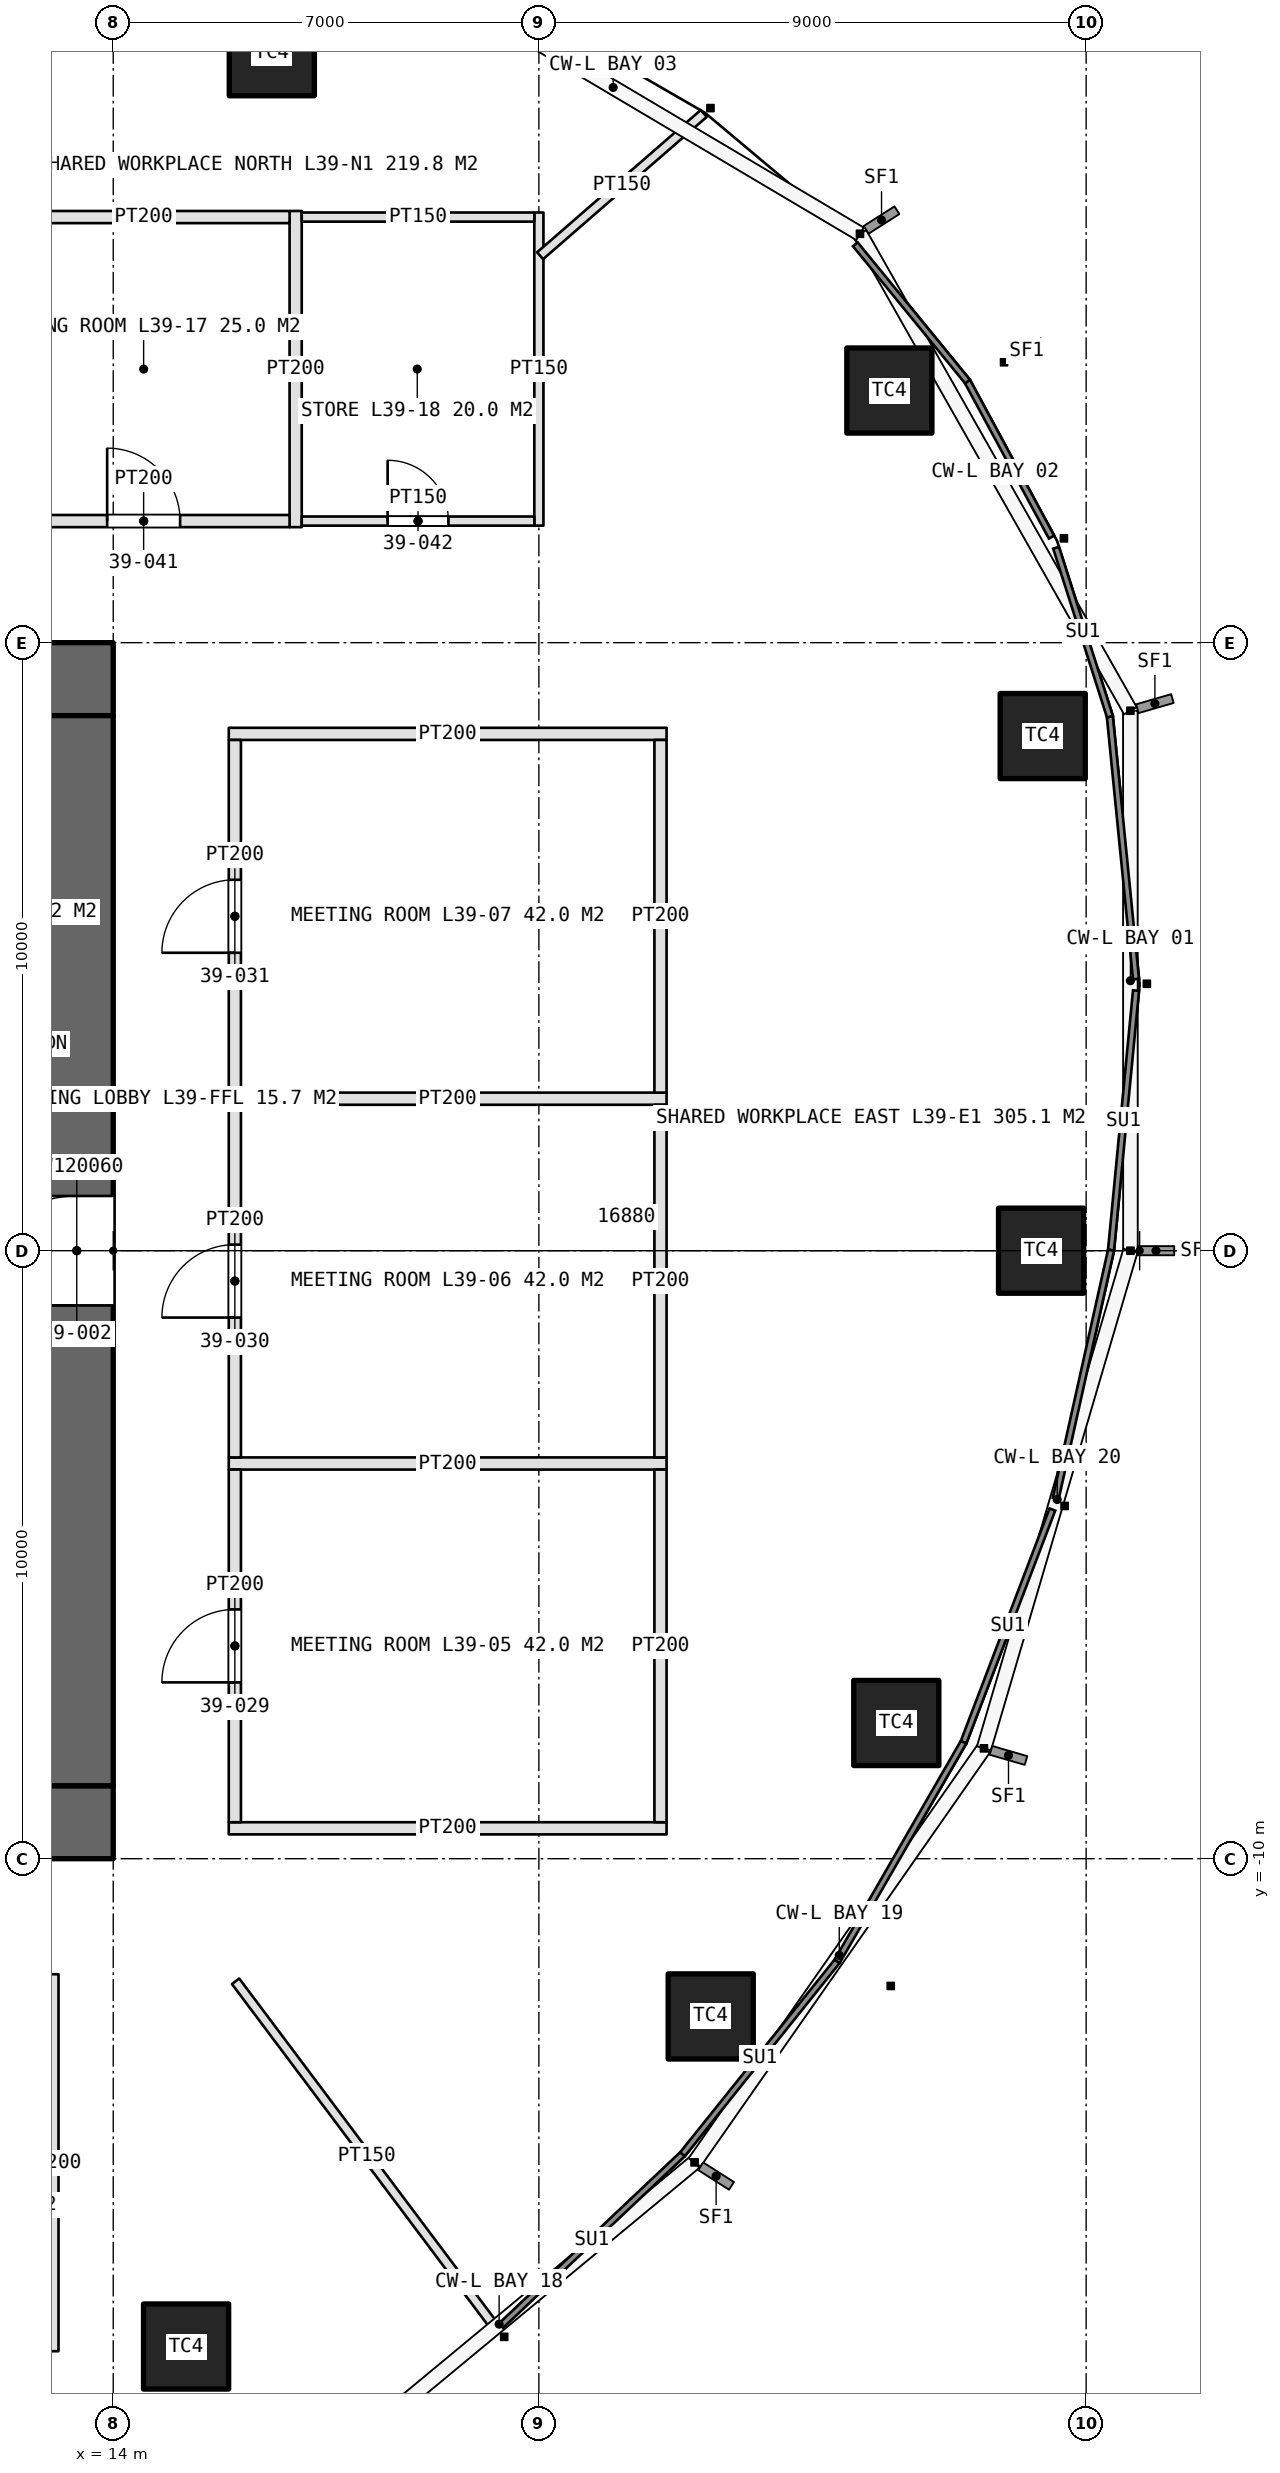
"""IFC4 building model, lengths in metres.
Left out: names, types, materials, properties, quantities, classifications, styles, units other than length and angle.
Written with IfcOpenShell. Run it as: python <this file> out.ifc"""

import sys

from ifc_helpers import new_model, si_unit, direction, frame, frame_2d, origin, origin_2d, place, context, subcontext, project, spatial, rectangle, extrude, element, fill, save


model = new_model("IFC4")
c1 = context("Model", 3, precision=1e-05, world=origin(), true_north=direction((0.0, 1.0)))
c2 = subcontext(c1, "Body", "Model", "MODEL_VIEW")
j1 = project(units=[si_unit("LENGTHUNIT", "METRE"), si_unit("PLANEANGLEUNIT", "RADIAN")], contexts=[c1])
p1 = place(None, origin())
s1 = spatial("IfcSite", under=j1, at=p1, CompositionType="ELEMENT")
p2 = place(p1, origin())
s2 = spatial("IfcBuilding", under=s1, at=p2, CompositionType="ELEMENT")
p3 = place(p2, frame((0.0, 0.0, 180.6)))
s3 = spatial("IfcBuildingStorey", under=s2, at=p3, CompositionType="ELEMENT", Elevation=180.6)
p4 = place(p3, frame((-14.0, -9.4, 0.0), z_axis=(0.0, 0.0, 1.0), x_axis=(1.0, 0.0, 0.0)))
e1 = element("IfcWall", 1, at=p4, inside=s3, PredefinedType="SHEAR", context=c2, shape_type="SweptSolid", body=[
    extrude(rectangle(XDim=28.0, YDim=1.2, at=frame_2d((14.0, 0.0))), origin(), (0.0, 0.0, 1.0), 4.2),
])
p5 = place(p4, frame((13.1, 0.0, 0.0)))
e2 = element("IfcOpeningElement", 2, at=p5, cuts=e1, PredefinedType="OPENING", context=c2, shape_type="SweptSolid", body=[
    extrude(rectangle(XDim=1.8, YDim=2.4, at=frame_2d((0.9, 1.2))), frame((0.0, 0.61, 0.0), z_axis=(0.0, -1.0, 0.0), x_axis=(1.0, 0.0, 0.0)), (0.0, 0.0, 1.0), 1.22),
])
p6 = place(p4, frame((22.9, 0.0, 0.0)))
e3 = element("IfcOpeningElement", 3, at=p6, cuts=e1, PredefinedType="OPENING", context=c2, shape_type="SweptSolid", body=[
    extrude(rectangle(XDim=2.2, YDim=2.7, at=frame_2d((1.1, 1.35))), frame((0.0, 0.61, 0.0), z_axis=(0.0, -1.0, 0.0), x_axis=(1.0, 0.0, 0.0)), (0.0, 0.0, 1.0), 1.22),
])
p7 = place(p3, frame((14.0, 9.4, 0.0), z_axis=(0.0, 0.0, 1.0), x_axis=(-1.0, 0.0, 0.0)))
e4 = element("IfcWall", 4, at=p7, inside=s3, PredefinedType="SHEAR", context=c2, shape_type="SweptSolid", body=[
    extrude(rectangle(XDim=28.0, YDim=1.2, at=frame_2d((14.0, 0.0))), origin(), (0.0, 0.0, 1.0), 4.2),
])
p8 = place(p7, frame((24.0, 0.0, 0.0)))
e5 = element("IfcOpeningElement", 5, at=p8, cuts=e4, PredefinedType="OPENING", context=c2, shape_type="SweptSolid", body=[
    extrude(rectangle(XDim=1.0, YDim=2.4, at=frame_2d((0.5, 1.2))), frame((0.0, 0.61, 0.0), z_axis=(0.0, -1.0, 0.0), x_axis=(1.0, 0.0, 0.0)), (0.0, 0.0, 1.0), 1.22),
])
p9 = place(p7, frame((13.1, 0.0, 0.0)))
e6 = element("IfcOpeningElement", 6, at=p9, cuts=e4, PredefinedType="OPENING", context=c2, shape_type="SweptSolid", body=[
    extrude(rectangle(XDim=1.8, YDim=2.4, at=frame_2d((0.9, 1.2))), frame((0.0, 0.61, 0.0), z_axis=(0.0, -1.0, 0.0), x_axis=(1.0, 0.0, 0.0)), (0.0, 0.0, 1.0), 1.22),
])
p10 = place(p3, frame((13.4, -8.8, 0.0), z_axis=(0.0, 0.0, 1.0), x_axis=(0.0, 1.0, 0.0)))
e7 = element("IfcWall", 7, at=p10, inside=s3, PredefinedType="SHEAR", context=c2, shape_type="SweptSolid", body=[
    extrude(rectangle(XDim=17.6, YDim=1.2, at=frame_2d((8.8, 0.0))), origin(), (0.0, 0.0, 1.0), 4.2),
])
p11 = place(p10, frame((7.9, 0.0, 0.0)))
e8 = element("IfcOpeningElement", 8, at=p11, cuts=e7, PredefinedType="OPENING", context=c2, shape_type="SweptSolid", body=[
    extrude(rectangle(XDim=1.8, YDim=2.4, at=frame_2d((0.9, 1.2))), frame((0.0, 0.61, 0.0), z_axis=(0.0, -1.0, 0.0), x_axis=(1.0, 0.0, 0.0)), (0.0, 0.0, 1.0), 1.22),
])
for number, where, z_axis, x_axis in (
    (9, (29.259, 0.0, 0.0), (0.0, 0.0, 1.0), (1.0, 0.0, 0.0)),
    (10, (29.286, 8.464, 0.0), (0.0, 0.0, 1.0), (1.0, 0.0, 0.0)),
    (11, (26.764, 14.147, 0.0), (0.0, 0.0, 1.0), (1.0, 0.0, 0.0)),
    (12, (16.608, 19.695, 0.0), (0.0, 0.0, 1.0), (1.0, 0.0, 0.0)),
    (13, (15.198, -18.023, 0.0), (0.0, 0.0, 1.0), (1.0, 0.0, 0.0)),
    (14, (23.826, -12.594, 0.0), (0.0, 0.0, 1.0), (1.0, 0.0, 0.0)),
    (15, (26.878, -7.768, 0.0), (0.0, 0.0, 1.0), (1.0, 0.0, 0.0)),
):
    element("IfcColumn", number, at=place(p3, frame(where, z_axis=z_axis, x_axis=x_axis)), inside=s3, PredefinedType="COLUMN", context=c2, shape_type="SweptSolid", body=[
        extrude(rectangle(XDim=1.4, YDim=1.4, at=origin_2d()), origin(), (0.0, 0.0, 1.0), 4.2),
    ])
for number, where, z_axis, x_axis in (
    (16, (15.9, -9.5, 0.0), (0.0, 0.0, 1.0), (1.0, 0.0, 0.0)),
    (17, (15.9, -3.5, 0.0), (0.0, 0.0, 1.0), (1.0, 0.0, 0.0)),
    (18, (15.9, 2.5, 0.0), (0.0, 0.0, 1.0), (1.0, 0.0, 0.0)),
    (19, (15.9, 8.5, 0.0), (0.0, 0.0, 1.0), (1.0, 0.0, 0.0)),
):
    element("IfcWall", number, at=place(p3, frame(where, z_axis=z_axis, x_axis=x_axis)), inside=s3, PredefinedType="PARTITIONING", context=c2, shape_type="SweptSolid", body=[
        extrude(rectangle(XDim=7.2, YDim=0.2, at=frame_2d((3.6, 0.0))), origin(), (0.0, 0.0, 1.0), 3.0),
    ])
p12 = place(p3, frame((16.0, -9.4, 0.0), z_axis=(0.0, 0.0, 1.0), x_axis=(0.0, 1.0, 0.0)))
e20 = element("IfcWall", 20, at=p12, inside=s3, PredefinedType="PARTITIONING", context=c2, shape_type="SweptSolid", body=[
    extrude(rectangle(XDim=5.8, YDim=0.2, at=frame_2d((2.9, 0.0))), origin(), (0.0, 0.0, 1.0), 3.0),
])
p13 = place(p12, frame((2.3, 0.0, 0.0)))
e21 = element("IfcOpeningElement", 21, at=p13, cuts=e20, PredefinedType="OPENING", context=c2, shape_type="SweptSolid", body=[
    extrude(rectangle(XDim=1.2, YDim=2.4, at=frame_2d((0.6, 1.2))), frame((0.0, 0.11, 0.0), z_axis=(0.0, -1.0, 0.0), x_axis=(1.0, 0.0, 0.0)), (0.0, 0.0, 1.0), 0.22),
])
p14 = place(p3, frame((23.0, -9.4, 0.0), z_axis=(0.0, 0.0, 1.0), x_axis=(0.0, 1.0, 0.0)))
e22 = element("IfcWall", 22, at=p14, inside=s3, PredefinedType="PARTITIONING", context=c2, shape_type="SweptSolid", body=[
    extrude(rectangle(XDim=5.8, YDim=0.2, at=frame_2d((2.9, 0.0))), origin(), (0.0, 0.0, 1.0), 3.0),
])
p15 = place(p3, frame((16.0, -3.4, 0.0), z_axis=(0.0, 0.0, 1.0), x_axis=(0.0, 1.0, 0.0)))
e23 = element("IfcWall", 23, at=p15, inside=s3, PredefinedType="PARTITIONING", context=c2, shape_type="SweptSolid", body=[
    extrude(rectangle(XDim=5.8, YDim=0.2, at=frame_2d((2.9, 0.0))), origin(), (0.0, 0.0, 1.0), 3.0),
])
p16 = place(p15, frame((2.3, 0.0, 0.0)))
e24 = element("IfcOpeningElement", 24, at=p16, cuts=e23, PredefinedType="OPENING", context=c2, shape_type="SweptSolid", body=[
    extrude(rectangle(XDim=1.2, YDim=2.4, at=frame_2d((0.6, 1.2))), frame((0.0, 0.11, 0.0), z_axis=(0.0, -1.0, 0.0), x_axis=(1.0, 0.0, 0.0)), (0.0, 0.0, 1.0), 0.22),
])
p17 = place(p3, frame((23.0, -3.4, 0.0), z_axis=(0.0, 0.0, 1.0), x_axis=(0.0, 1.0, 0.0)))
e25 = element("IfcWall", 25, at=p17, inside=s3, PredefinedType="PARTITIONING", context=c2, shape_type="SweptSolid", body=[
    extrude(rectangle(XDim=5.8, YDim=0.2, at=frame_2d((2.9, 0.0))), origin(), (0.0, 0.0, 1.0), 3.0),
])
p18 = place(p3, frame((16.0, 2.6, 0.0), z_axis=(0.0, 0.0, 1.0), x_axis=(0.0, 1.0, 0.0)))
e26 = element("IfcWall", 26, at=p18, inside=s3, PredefinedType="PARTITIONING", context=c2, shape_type="SweptSolid", body=[
    extrude(rectangle(XDim=5.8, YDim=0.2, at=frame_2d((2.9, 0.0))), origin(), (0.0, 0.0, 1.0), 3.0),
])
p19 = place(p18, frame((2.3, 0.0, 0.0)))
e27 = element("IfcOpeningElement", 27, at=p19, cuts=e26, PredefinedType="OPENING", context=c2, shape_type="SweptSolid", body=[
    extrude(rectangle(XDim=1.2, YDim=2.4, at=frame_2d((0.6, 1.2))), frame((0.0, 0.11, 0.0), z_axis=(0.0, -1.0, 0.0), x_axis=(1.0, 0.0, 0.0)), (0.0, 0.0, 1.0), 0.22),
])
p20 = place(p3, frame((23.0, 2.6, 0.0), z_axis=(0.0, 0.0, 1.0), x_axis=(0.0, 1.0, 0.0)))
e28 = element("IfcWall", 28, at=p20, inside=s3, PredefinedType="PARTITIONING", context=c2, shape_type="SweptSolid", body=[
    extrude(rectangle(XDim=5.8, YDim=0.2, at=frame_2d((2.9, 0.0))), origin(), (0.0, 0.0, 1.0), 3.0),
])
p21 = place(p3, frame((13.0, -11.9, 0.0), z_axis=(0.0, 0.0, 1.0), x_axis=(0.0, -1.0, 0.0)))
e29 = element("IfcWall", 29, at=p21, inside=s3, PredefinedType="PARTITIONING", context=c2, shape_type="SweptSolid", body=[
    extrude(rectangle(XDim=6.2, YDim=0.2, at=frame_2d((3.1, 0.0))), origin(), (0.0, 0.0, 1.0), 3.0),
])
p22 = place(p3, frame((17.0, 11.9, 0.0), z_axis=(0.0, 0.0, 1.0), x_axis=(0.0, 1.0, 0.0)))
e30 = element("IfcWall", 30, at=p22, inside=s3, PredefinedType="PARTITIONING", context=c2, shape_type="SweptSolid", body=[
    extrude(rectangle(XDim=5.2, YDim=0.2, at=frame_2d((2.6, 0.0))), origin(), (0.0, 0.0, 1.0), 3.0),
])
p23 = place(p3, frame((21.0, 11.925, 0.0), z_axis=(0.0, 0.0, 1.0), x_axis=(0.0, 1.0, 0.0)))
e31 = element("IfcWall", 31, at=p23, inside=s3, PredefinedType="PARTITIONING", context=c2, shape_type="SweptSolid", body=[
    extrude(rectangle(XDim=5.15, YDim=0.15, at=frame_2d((2.575, 0.0))), origin(), (0.0, 0.0, 1.0), 3.0),
])
p24 = place(p3, frame((12.1, 12.0, 0.0), z_axis=(0.0, 0.0, 1.0), x_axis=(1.0, 0.0, 0.0)))
e32 = element("IfcWall", 32, at=p24, inside=s3, PredefinedType="PARTITIONING", context=c2, shape_type="SweptSolid", body=[
    extrude(rectangle(XDim=4.8, YDim=0.2, at=frame_2d((2.4, 0.0))), origin(), (0.0, 0.0, 1.0), 3.0),
])
p25 = place(p24, frame((1.8, 0.0, 0.0)))
e33 = element("IfcOpeningElement", 33, at=p25, cuts=e32, PredefinedType="OPENING", context=c2, shape_type="SweptSolid", body=[
    extrude(rectangle(XDim=1.2, YDim=2.4, at=frame_2d((0.6, 1.2))), frame((0.0, 0.11, 0.0), z_axis=(0.0, -1.0, 0.0), x_axis=(1.0, 0.0, 0.0)), (0.0, 0.0, 1.0), 0.22),
])
p26 = place(p3, frame((12.1, 17.0, 0.0), z_axis=(0.0, 0.0, 1.0), x_axis=(1.0, 0.0, 0.0)))
e34 = element("IfcWall", 34, at=p26, inside=s3, PredefinedType="PARTITIONING", context=c2, shape_type="SweptSolid", body=[
    extrude(rectangle(XDim=4.8, YDim=0.2, at=frame_2d((2.4, 0.0))), origin(), (0.0, 0.0, 1.0), 3.0),
])
p27 = place(p3, frame((17.1, 12.0, 0.0), z_axis=(0.0, 0.0, 1.0), x_axis=(1.0, 0.0, 0.0)))
e35 = element("IfcWall", 35, at=p27, inside=s3, PredefinedType="PARTITIONING", context=c2, shape_type="SweptSolid", body=[
    extrude(rectangle(XDim=3.825, YDim=0.15, at=frame_2d((1.913, 0.0))), origin(), (0.0, 0.0, 1.0), 3.0),
])
p28 = place(p27, frame((1.413, 0.0, 0.0)))
e36 = element("IfcOpeningElement", 36, at=p28, cuts=e35, PredefinedType="OPENING", context=c2, shape_type="SweptSolid", body=[
    extrude(rectangle(XDim=1.0, YDim=2.2, at=frame_2d((0.5, 1.1))), frame((0.0, 0.085, 0.0), z_axis=(0.0, -1.0, 0.0), x_axis=(1.0, 0.0, 0.0)), (0.0, 0.0, 1.0), 0.17),
])
p29 = place(p3, frame((17.1, 17.0, 0.0), z_axis=(0.0, 0.0, 1.0), x_axis=(1.0, 0.0, 0.0)))
e37 = element("IfcWall", 37, at=p29, inside=s3, PredefinedType="PARTITIONING", context=c2, shape_type="SweptSolid", body=[
    extrude(rectangle(XDim=3.825, YDim=0.15, at=frame_2d((1.913, 0.0))), origin(), (0.0, 0.0, 1.0), 3.0),
])
p30 = place(p3, frame((16.012, -12.016, 0.0), z_axis=(0.0, 0.0, 1.0), x_axis=(0.600059749679, -0.799955184254, 0.0)))
e38 = element("IfcWall", 38, at=p30, inside=s3, PredefinedType="PARTITIONING", context=c2, shape_type="SweptSolid", body=[
    extrude(rectangle(XDim=7.191, YDim=0.15, at=frame_2d((3.596, 0.0))), origin(), (0.0, 0.0, 1.0), 3.0),
])
p31 = place(p3, frame((21.02, 16.364, 0.0), z_axis=(0.0, 0.0, 1.0), x_axis=(0.75467183248, 0.656102450278, 0.0)))
e39 = element("IfcWall", 39, at=p31, inside=s3, PredefinedType="PARTITIONING", context=c2, shape_type="SweptSolid", body=[
    extrude(rectangle(XDim=3.567, YDim=0.15, at=frame_2d((1.783, 0.0))), origin(), (0.0, 0.0, 1.0), 3.0),
])
p32 = place(p11, origin())
e40 = element("IfcDoor", 40, at=p32, inside=s3, OperationType="DOUBLE_DOOR_SINGLE_SWING", PredefinedType="DOOR", context=c2, shape_type="SweptSolid", body=[
    extrude(rectangle(XDim=1.8, YDim=2.4, at=frame_2d((0.9, 1.2))), frame((0.0, 0.025, 0.0), z_axis=(0.0, -1.0, 0.0), x_axis=(1.0, 0.0, 0.0)), (0.0, 0.0, 1.0), 0.05),
])
fill(e8, e40)
p33 = place(p13, origin())
e41 = element("IfcDoor", 41, at=p33, inside=s3, OperationType="SINGLE_SWING_LEFT", PredefinedType="DOOR", context=c2, shape_type="SweptSolid", body=[
    extrude(rectangle(XDim=1.2, YDim=2.4, at=frame_2d((0.6, 1.2))), frame((0.0, 0.025, 0.0), z_axis=(0.0, -1.0, 0.0), x_axis=(1.0, 0.0, 0.0)), (0.0, 0.0, 1.0), 0.05),
])
fill(e21, e41)
p34 = place(p16, origin())
e42 = element("IfcDoor", 42, at=p34, inside=s3, OperationType="SINGLE_SWING_LEFT", PredefinedType="DOOR", context=c2, shape_type="SweptSolid", body=[
    extrude(rectangle(XDim=1.2, YDim=2.4, at=frame_2d((0.6, 1.2))), frame((0.0, 0.025, 0.0), z_axis=(0.0, -1.0, 0.0), x_axis=(1.0, 0.0, 0.0)), (0.0, 0.0, 1.0), 0.05),
])
fill(e24, e42)
p35 = place(p19, origin())
e43 = element("IfcDoor", 43, at=p35, inside=s3, OperationType="SINGLE_SWING_LEFT", PredefinedType="DOOR", context=c2, shape_type="SweptSolid", body=[
    extrude(rectangle(XDim=1.2, YDim=2.4, at=frame_2d((0.6, 1.2))), frame((0.0, 0.025, 0.0), z_axis=(0.0, -1.0, 0.0), x_axis=(1.0, 0.0, 0.0)), (0.0, 0.0, 1.0), 0.05),
])
fill(e27, e43)
p36 = place(p25, origin())
e44 = element("IfcDoor", 44, at=p36, inside=s3, OperationType="SINGLE_SWING_LEFT", PredefinedType="DOOR", context=c2, shape_type="SweptSolid", body=[
    extrude(rectangle(XDim=1.2, YDim=2.4, at=frame_2d((0.6, 1.2))), frame((0.0, 0.025, 0.0), z_axis=(0.0, -1.0, 0.0), x_axis=(1.0, 0.0, 0.0)), (0.0, 0.0, 1.0), 0.05),
])
fill(e33, e44)
p37 = place(p28, origin())
e45 = element("IfcDoor", 45, at=p37, inside=s3, OperationType="SINGLE_SWING_LEFT", PredefinedType="DOOR", context=c2, shape_type="SweptSolid", body=[
    extrude(rectangle(XDim=1.0, YDim=2.2, at=frame_2d((0.5, 1.1))), frame((0.0, 0.025, 0.0), z_axis=(0.0, -1.0, 0.0), x_axis=(1.0, 0.0, 0.0)), (0.0, 0.0, 1.0), 0.05),
])
fill(e36, e45)
save(model, sys.argv[1])
